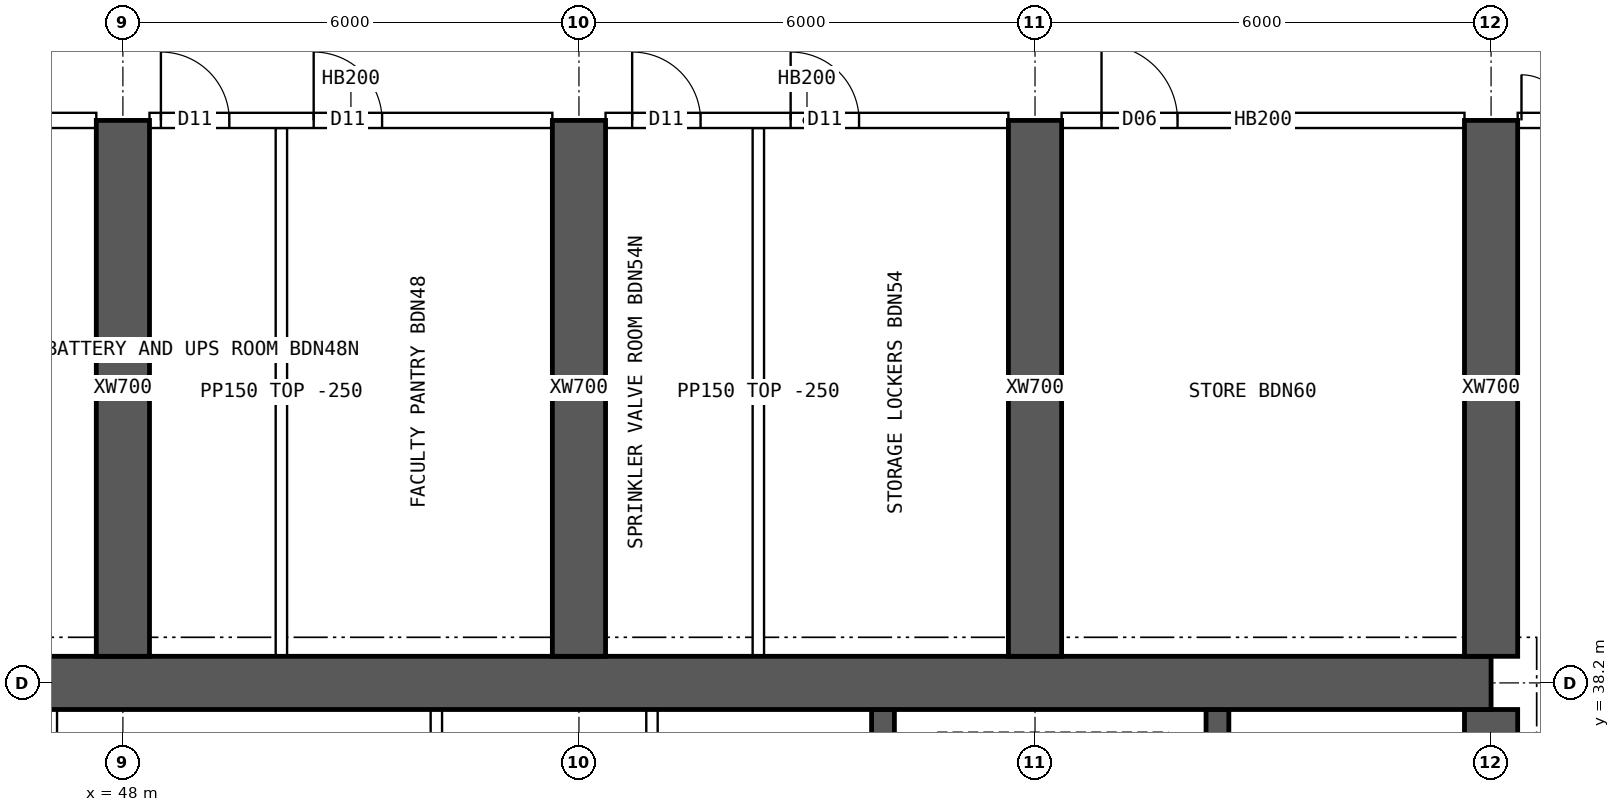
"""IFC4 building model, lengths in metres.
Left out: names, types, materials, properties, quantities, classifications, styles, units other than length and angle.
Written with IfcOpenShell. Run it as: python <this file> out.ifc"""

import sys

from ifc_helpers import new_model, si_unit, direction, frame, frame_2d, origin, place, context, subcontext, project, spatial, rectangle, extrude, element, fill, save


model = new_model("IFC4")
c1 = context("Model", 3, precision=1e-05, world=origin(), true_north=direction((0.0, 1.0)))
c2 = subcontext(c1, "Body", "Model", "MODEL_VIEW")
j1 = project(units=[si_unit("LENGTHUNIT", "METRE"), si_unit("PLANEANGLEUNIT", "RADIAN")], contexts=[c1])
p1 = place(None, origin())
s1 = spatial("IfcSite", under=j1, at=p1, CompositionType="ELEMENT")
p2 = place(p1, origin())
s2 = spatial("IfcBuilding", under=s1, at=p2, CompositionType="ELEMENT")
p3 = place(p2, frame((0.0, 0.0, 239.05)))
s3 = spatial("IfcBuildingStorey", under=s2, at=p3, CompositionType="ELEMENT", Elevation=239.05)
p4 = place(p3, frame((18.0, 38.2, 0.0), z_axis=(0.0, 0.0, 1.0), x_axis=(1.0, 0.0, 0.0)))
e1 = element("IfcWall", 1, at=p4, inside=s3, PredefinedType="SHEAR", context=c2, shape_type="SweptSolid", body=[
    extrude(rectangle(XDim=48.0, YDim=0.7, at=frame_2d((24.0, 0.0))), origin(), (0.0, 0.0, 1.0), 3.75),
])
p5 = place(p3, frame((66.0, 26.15, 0.0), z_axis=(0.0, 0.0, 1.0), x_axis=(0.0, 1.0, 0.0)))
e2 = element("IfcWall", 2, at=p5, inside=s3, PredefinedType="SHEAR", context=c2, shape_type="SweptSolid", body=[
    extrude(rectangle(XDim=11.7, YDim=0.7, at=frame_2d((5.85, 0.0))), origin(), (0.0, 0.0, 1.0), 3.75),
])
p6 = place(p5, frame((5.15, 0.0, 0.0)))
e3 = element("IfcOpeningElement", 3, at=p6, cuts=e2, PredefinedType="OPENING", context=c2, shape_type="SweptSolid", body=[
    extrude(rectangle(XDim=1.2, YDim=2.1, at=frame_2d((0.6, 1.05))), frame((0.0, 0.36, 0.0), z_axis=(0.0, -1.0, 0.0), x_axis=(1.0, 0.0, 0.0)), (0.0, 0.0, 1.0), 0.72),
])
for number, where, z_axis, x_axis in (
    (4, (62.4, 34.75, 0.0), (0.0, 0.0, 1.0), (0.0, 1.0, 0.0)),
    (5, (58.0, 34.75, 0.0), (0.0, 0.0, 1.0), (0.0, 1.0, 0.0)),
):
    element("IfcWall", number, at=place(p3, frame(where, z_axis=z_axis, x_axis=x_axis)), inside=s3, PredefinedType="SHEAR", context=c2, shape_type="SweptSolid", body=[
        extrude(rectangle(XDim=3.1, YDim=0.3, at=frame_2d((1.55, 0.0))), origin(), (0.0, 0.0, 1.0), 3.75),
    ])
for number, where, z_axis, x_axis in (
    (6, (48.0, 38.55, 0.0), (0.0, 0.0, 1.0), (0.0, 1.0, 0.0)),
    (7, (54.0, 38.55, 0.0), (0.0, 0.0, 1.0), (0.0, 1.0, 0.0)),
    (8, (60.0, 38.55, 0.0), (0.0, 0.0, 1.0), (0.0, 1.0, 0.0)),
    (9, (66.0, 38.55, 0.0), (0.0, 0.0, 1.0), (0.0, 1.0, 0.0)),
):
    element("IfcWall", number, at=place(p3, frame(where, z_axis=z_axis, x_axis=x_axis)), inside=s3, PredefinedType="SHEAR", context=c2, shape_type="SweptSolid", body=[
        extrude(rectangle(XDim=7.05, YDim=0.7, at=frame_2d((3.525, 0.0))), origin(), (0.0, 0.0, 1.0), 3.75),
    ])
for number, where, z_axis, x_axis in (
    (10, (47.058, 34.75, 0.0), (0.0, 0.0, 1.0), (0.0, 1.0, 0.0)),
    (11, (52.124, 34.75, 0.0), (0.0, 0.0, 1.0), (0.0, 1.0, 0.0)),
    (12, (54.961, 34.75, 0.0), (0.0, 0.0, 1.0), (0.0, 1.0, 0.0)),
):
    element("IfcWall", number, at=place(p3, frame(where, z_axis=z_axis, x_axis=x_axis)), inside=s3, PredefinedType="SOLIDWALL", context=c2, shape_type="SweptSolid", body=[
        extrude(rectangle(XDim=3.1, YDim=0.15, at=frame_2d((1.55, 0.0))), origin(), (0.0, 0.0, 1.0), 3.5),
    ])
p7 = place(p3, frame((42.35, 45.6, 0.0), z_axis=(0.0, 0.0, 1.0), x_axis=(1.0, 0.0, 0.0)))
e13 = element("IfcWall", 13, at=p7, inside=s3, PredefinedType="SOLIDWALL", context=c2, shape_type="SweptSolid", body=[
    extrude(rectangle(XDim=5.3, YDim=0.2, at=frame_2d((2.65, 0.0))), origin(), (0.0, 0.0, 1.0), 3.5),
])
p8 = place(p7, frame((0.35, 0.0, 0.0)))
e14 = element("IfcOpeningElement", 14, at=p8, cuts=e13, PredefinedType="OPENING", context=c2, shape_type="SweptSolid", body=[
    extrude(rectangle(XDim=0.9, YDim=2.1, at=frame_2d((0.45, 1.05))), frame((0.0, 0.11, 0.0), z_axis=(0.0, -1.0, 0.0), x_axis=(1.0, 0.0, 0.0)), (0.0, 0.0, 1.0), 0.22),
])
p9 = place(p7, frame((2.565, 0.0, 0.0)))
e15 = element("IfcOpeningElement", 15, at=p9, cuts=e13, PredefinedType="OPENING", context=c2, shape_type="SweptSolid", body=[
    extrude(rectangle(XDim=0.9, YDim=2.1, at=frame_2d((0.45, 1.05))), frame((0.0, 0.11, 0.0), z_axis=(0.0, -1.0, 0.0), x_axis=(1.0, 0.0, 0.0)), (0.0, 0.0, 1.0), 0.22),
])
p10 = place(p3, frame((48.35, 45.6, 0.0), z_axis=(0.0, 0.0, 1.0), x_axis=(1.0, 0.0, 0.0)))
e16 = element("IfcWall", 16, at=p10, inside=s3, PredefinedType="SOLIDWALL", context=c2, shape_type="SweptSolid", body=[
    extrude(rectangle(XDim=5.3, YDim=0.2, at=frame_2d((2.65, 0.0))), origin(), (0.0, 0.0, 1.0), 3.5),
])
p11 = place(p10, frame((0.15, 0.0, 0.0)))
e17 = element("IfcOpeningElement", 17, at=p11, cuts=e16, PredefinedType="OPENING", context=c2, shape_type="SweptSolid", body=[
    extrude(rectangle(XDim=0.9, YDim=2.1, at=frame_2d((0.45, 1.05))), frame((0.0, 0.11, 0.0), z_axis=(0.0, -1.0, 0.0), x_axis=(1.0, 0.0, 0.0)), (0.0, 0.0, 1.0), 0.22),
])
p12 = place(p10, frame((2.16, 0.0, 0.0)))
e18 = element("IfcOpeningElement", 18, at=p12, cuts=e16, PredefinedType="OPENING", context=c2, shape_type="SweptSolid", body=[
    extrude(rectangle(XDim=0.9, YDim=2.1, at=frame_2d((0.45, 1.05))), frame((0.0, 0.11, 0.0), z_axis=(0.0, -1.0, 0.0), x_axis=(1.0, 0.0, 0.0)), (0.0, 0.0, 1.0), 0.22),
])
p13 = place(p3, frame((54.35, 45.6, 0.0), z_axis=(0.0, 0.0, 1.0), x_axis=(1.0, 0.0, 0.0)))
e19 = element("IfcWall", 19, at=p13, inside=s3, PredefinedType="SOLIDWALL", context=c2, shape_type="SweptSolid", body=[
    extrude(rectangle(XDim=5.3, YDim=0.2, at=frame_2d((2.65, 0.0))), origin(), (0.0, 0.0, 1.0), 3.5),
])
p14 = place(p13, frame((0.35, 0.0, 0.0)))
e20 = element("IfcOpeningElement", 20, at=p14, cuts=e19, PredefinedType="OPENING", context=c2, shape_type="SweptSolid", body=[
    extrude(rectangle(XDim=0.9, YDim=2.1, at=frame_2d((0.45, 1.05))), frame((0.0, 0.11, 0.0), z_axis=(0.0, -1.0, 0.0), x_axis=(1.0, 0.0, 0.0)), (0.0, 0.0, 1.0), 0.22),
])
p15 = place(p13, frame((2.435, 0.0, 0.0)))
e21 = element("IfcOpeningElement", 21, at=p15, cuts=e19, PredefinedType="OPENING", context=c2, shape_type="SweptSolid", body=[
    extrude(rectangle(XDim=0.9, YDim=2.1, at=frame_2d((0.45, 1.05))), frame((0.0, 0.11, 0.0), z_axis=(0.0, -1.0, 0.0), x_axis=(1.0, 0.0, 0.0)), (0.0, 0.0, 1.0), 0.22),
])
p16 = place(p3, frame((60.35, 45.6, 0.0), z_axis=(0.0, 0.0, 1.0), x_axis=(1.0, 0.0, 0.0)))
e22 = element("IfcWall", 22, at=p16, inside=s3, PredefinedType="SOLIDWALL", context=c2, shape_type="SweptSolid", body=[
    extrude(rectangle(XDim=5.3, YDim=0.2, at=frame_2d((2.65, 0.0))), origin(), (0.0, 0.0, 1.0), 3.5),
])
p17 = place(p16, frame((0.525, 0.0, 0.0)))
e23 = element("IfcOpeningElement", 23, at=p17, cuts=e22, PredefinedType="OPENING", context=c2, shape_type="SweptSolid", body=[
    extrude(rectangle(XDim=1.0, YDim=2.1, at=frame_2d((0.5, 1.05))), frame((0.0, 0.11, 0.0), z_axis=(0.0, -1.0, 0.0), x_axis=(1.0, 0.0, 0.0)), (0.0, 0.0, 1.0), 0.22),
])
p18 = place(p3, frame((66.35, 45.6, 0.0), z_axis=(0.0, 0.0, 1.0), x_axis=(1.0, 0.0, 0.0)))
e24 = element("IfcWall", 24, at=p18, inside=s3, PredefinedType="SOLIDWALL", context=c2, shape_type="SweptSolid", body=[
    extrude(rectangle(XDim=2.05, YDim=0.2, at=frame_2d((1.025, 0.0))), origin(), (0.0, 0.0, 1.0), 3.5),
])
p19 = place(p18, frame((0.05, 0.0, 0.0)))
e25 = element("IfcOpeningElement", 25, at=p19, cuts=e24, PredefinedType="OPENING", context=c2, shape_type="SweptSolid", body=[
    extrude(rectangle(XDim=1.2, YDim=2.1, at=frame_2d((0.6, 1.05))), frame((0.0, 0.11, 0.0), z_axis=(0.0, -1.0, 0.0), x_axis=(1.0, 0.0, 0.0)), (0.0, 0.0, 1.0), 0.22),
])
for number, where, z_axis, x_axis in (
    (26, (50.085, 38.55, 0.0), (0.0, 0.0, 1.0), (0.0, 1.0, 0.0)),
    (27, (56.36, 38.55, 0.0), (0.0, 0.0, 1.0), (0.0, 1.0, 0.0)),
):
    element("IfcWall", number, at=place(p3, frame(where, z_axis=z_axis, x_axis=x_axis)), inside=s3, PredefinedType="PARTITIONING", context=c2, shape_type="SweptSolid", body=[
        extrude(rectangle(XDim=6.95, YDim=0.15, at=frame_2d((3.475, 0.0))), origin(), (0.0, 0.0, 1.0), 3.5),
    ])
p20 = place(p19, origin())
e28 = element("IfcDoor", 28, at=p20, inside=s3, OperationType="DOUBLE_DOOR_SINGLE_SWING", PredefinedType="DOOR", context=c2, shape_type="SweptSolid", body=[
    extrude(rectangle(XDim=1.2, YDim=2.1, at=frame_2d((0.6, 1.05))), frame((0.0, 0.025, 0.0), z_axis=(0.0, -1.0, 0.0), x_axis=(1.0, 0.0, 0.0)), (0.0, 0.0, 1.0), 0.05),
])
fill(e25, e28)
p21 = place(p11, origin())
e29 = element("IfcDoor", 29, at=p21, inside=s3, OperationType="SINGLE_SWING_LEFT", PredefinedType="DOOR", context=c2, shape_type="SweptSolid", body=[
    extrude(rectangle(XDim=0.9, YDim=2.1, at=frame_2d((0.45, 1.05))), frame((0.0, 0.025, 0.0), z_axis=(0.0, -1.0, 0.0), x_axis=(1.0, 0.0, 0.0)), (0.0, 0.0, 1.0), 0.05),
])
fill(e17, e29)
p22 = place(p12, origin())
e30 = element("IfcDoor", 30, at=p22, inside=s3, OperationType="SINGLE_SWING_LEFT", PredefinedType="DOOR", context=c2, shape_type="SweptSolid", body=[
    extrude(rectangle(XDim=0.9, YDim=2.1, at=frame_2d((0.45, 1.05))), frame((0.0, 0.025, 0.0), z_axis=(0.0, -1.0, 0.0), x_axis=(1.0, 0.0, 0.0)), (0.0, 0.0, 1.0), 0.05),
])
fill(e18, e30)
p23 = place(p14, origin())
e31 = element("IfcDoor", 31, at=p23, inside=s3, OperationType="SINGLE_SWING_LEFT", PredefinedType="DOOR", context=c2, shape_type="SweptSolid", body=[
    extrude(rectangle(XDim=0.9, YDim=2.1, at=frame_2d((0.45, 1.05))), frame((0.0, 0.025, 0.0), z_axis=(0.0, -1.0, 0.0), x_axis=(1.0, 0.0, 0.0)), (0.0, 0.0, 1.0), 0.05),
])
fill(e20, e31)
p24 = place(p15, origin())
e32 = element("IfcDoor", 32, at=p24, inside=s3, OperationType="SINGLE_SWING_LEFT", PredefinedType="DOOR", context=c2, shape_type="SweptSolid", body=[
    extrude(rectangle(XDim=0.9, YDim=2.1, at=frame_2d((0.45, 1.05))), frame((0.0, 0.025, 0.0), z_axis=(0.0, -1.0, 0.0), x_axis=(1.0, 0.0, 0.0)), (0.0, 0.0, 1.0), 0.05),
])
fill(e21, e32)
p25 = place(p17, origin())
e33 = element("IfcDoor", 33, at=p25, inside=s3, OperationType="SINGLE_SWING_LEFT", PredefinedType="DOOR", context=c2, shape_type="SweptSolid", body=[
    extrude(rectangle(XDim=1.0, YDim=2.1, at=frame_2d((0.5, 1.05))), frame((0.0, 0.025, 0.0), z_axis=(0.0, -1.0, 0.0), x_axis=(1.0, 0.0, 0.0)), (0.0, 0.0, 1.0), 0.05),
])
fill(e23, e33)
save(model, sys.argv[1])
